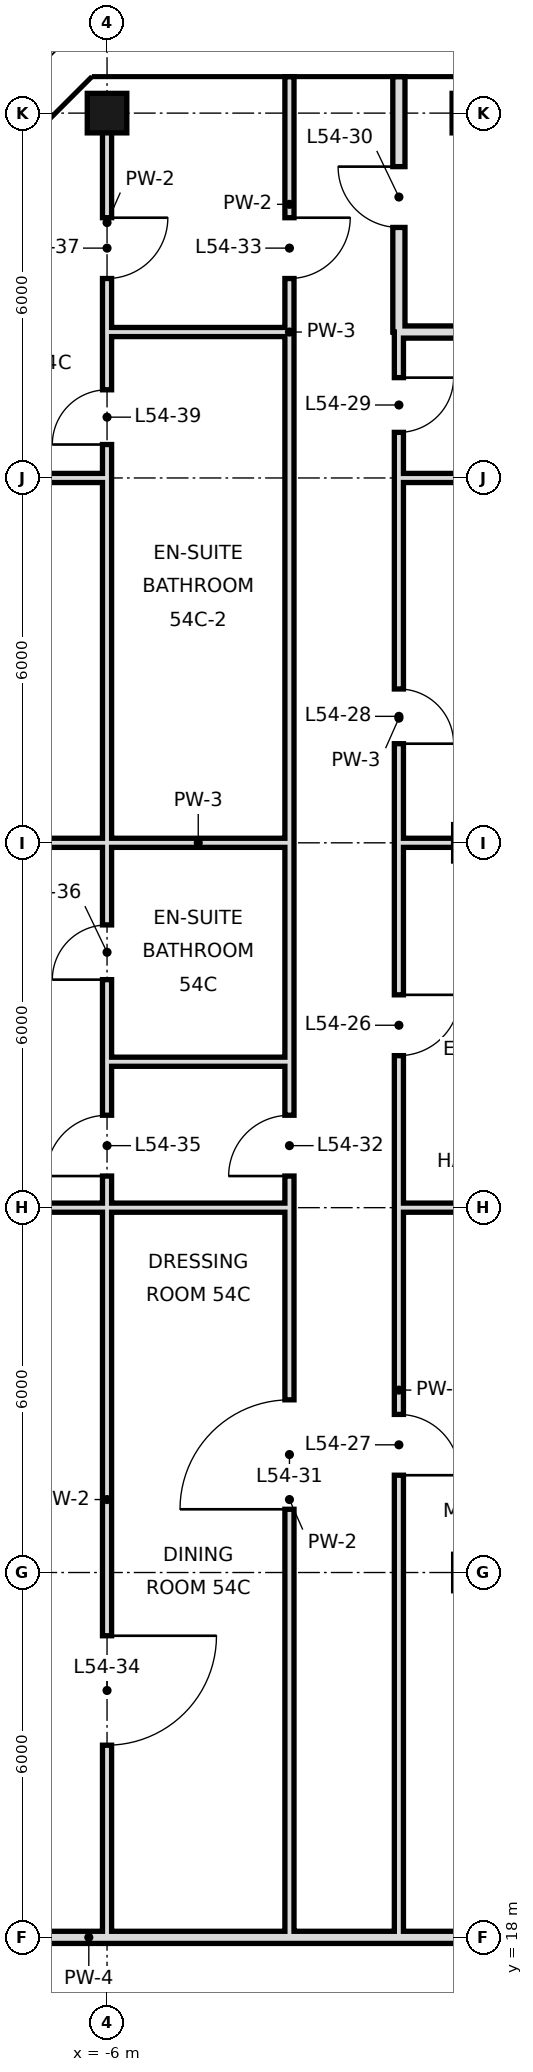
"""IFC4 building model, lengths in metres.
Left out: names, types, materials, properties, quantities, classifications, styles, units other than length and angle.
Written with IfcOpenShell. Run it as: python <this file> out.ifc"""

import sys

from ifc_helpers import new_model, si_unit, direction, frame, frame_2d, origin, origin_2d, place, context, subcontext, project, spatial, rectangle, hollow_rectangle, extrude, element, fill, save


model = new_model("IFC4")
c1 = context("Model", 3, precision=1e-05, world=origin(), true_north=direction((0.0, 1.0)))
c2 = subcontext(c1, "Body", "Model", "MODEL_VIEW")
j1 = project(units=[si_unit("LENGTHUNIT", "METRE"), si_unit("PLANEANGLEUNIT", "RADIAN")], contexts=[c1])
p1 = place(None, origin())
s1 = spatial("IfcSite", under=j1, at=p1, CompositionType="ELEMENT")
p2 = place(p1, origin())
s2 = spatial("IfcBuilding", under=s1, at=p2, CompositionType="ELEMENT")
p3 = place(p2, frame((0.0, 0.0, 229.8)))
s3 = spatial("IfcBuildingStorey", under=s2, at=p3, CompositionType="ELEMENT", Elevation=229.8)
for number, where, z_axis, x_axis in (
    (1, (-6.0, 48.0, 0.0), (0.0, 0.0, 1.0), (1.0, 0.0, 0.0)),
    (2, (0.0, 48.0, 0.0), (0.0, 0.0, 1.0), (1.0, 0.0, 0.0)),
):
    element("IfcColumn", number, at=place(p3, frame(where, z_axis=z_axis, x_axis=x_axis)), inside=s3, PredefinedType="COLUMN", context=c2, shape_type="SweptSolid", body=[
        extrude(hollow_rectangle(XDim=0.65, YDim=0.65, WallThickness=0.032, at=origin_2d()), origin(), (0.0, 0.0, 1.0), 4.4),
    ])
p4 = place(p3, frame((-1.2, 44.4, 0.0), z_axis=(0.0, 0.0, 1.0), x_axis=(0.0, 1.0, 0.0)))
e3 = element("IfcWall", 3, at=p4, inside=s3, PredefinedType="SOLIDWALL", context=c2, shape_type="SweptSolid", body=[
    extrude(rectangle(XDim=4.2, YDim=0.2, at=frame_2d((2.1, 0.0))), origin(), (0.0, 0.0, 1.0), 3.65),
])
p5 = place(p4, frame((1.72, 0.0, 0.0)))
e4 = element("IfcOpeningElement", 4, at=p5, cuts=e3, PredefinedType="OPENING", context=c2, shape_type="SweptSolid", body=[
    extrude(rectangle(XDim=1.0, YDim=2.4, at=frame_2d((0.5, 1.2))), frame((0.0, 0.11, 0.0), z_axis=(0.0, -1.0, 0.0), x_axis=(1.0, 0.0, 0.0)), (0.0, 0.0, 1.0), 0.22),
])
p6 = place(p3, frame((-1.2, 18.0, 0.0), z_axis=(0.0, 0.0, 1.0), x_axis=(0.0, 1.0, 0.0)))
e5 = element("IfcWall", 5, at=p6, inside=s3, PredefinedType="PARTITIONING", context=c2, shape_type="SweptSolid", body=[
    extrude(rectangle(XDim=18.0, YDim=0.15, at=frame_2d((9.0, 0.0))), origin(), (0.0, 0.0, 1.0), 4.1),
])
p7 = place(p6, frame((14.5, 0.0, 0.0)))
e6 = element("IfcOpeningElement", 6, at=p7, cuts=e5, PredefinedType="OPENING", context=c2, shape_type="SweptSolid", body=[
    extrude(rectangle(XDim=1.0, YDim=2.4, at=frame_2d((0.5, 1.2))), frame((0.0, 0.085, 0.0), z_axis=(0.0, -1.0, 0.0), x_axis=(1.0, 0.0, 0.0)), (0.0, 0.0, 1.0), 0.17),
])
p8 = place(p6, frame((7.6, 0.0, 0.0)))
e7 = element("IfcOpeningElement", 7, at=p8, cuts=e5, PredefinedType="OPENING", context=c2, shape_type="SweptSolid", body=[
    extrude(rectangle(XDim=1.0, YDim=2.4, at=frame_2d((0.5, 1.2))), frame((0.0, 0.085, 0.0), z_axis=(0.0, -1.0, 0.0), x_axis=(1.0, 0.0, 0.0)), (0.0, 0.0, 1.0), 0.17),
])
p9 = place(p3, frame((-1.2, 36.0, 0.0), z_axis=(0.0, 0.0, 1.0), x_axis=(0.0, 1.0, 0.0)))
e8 = element("IfcWall", 8, at=p9, inside=s3, PredefinedType="PARTITIONING", context=c2, shape_type="SweptSolid", body=[
    extrude(rectangle(XDim=8.4, YDim=0.15, at=frame_2d((4.2, 0.0))), origin(), (0.0, 0.0, 1.0), 4.1),
])
p10 = place(p9, frame((1.63, 0.0, 0.0)))
e9 = element("IfcOpeningElement", 9, at=p10, cuts=e8, PredefinedType="OPENING", context=c2, shape_type="SweptSolid", body=[
    extrude(rectangle(XDim=0.9, YDim=2.1, at=frame_2d((0.45, 1.05))), frame((0.0, 0.085, 0.0), z_axis=(0.0, -1.0, 0.0), x_axis=(1.0, 0.0, 0.0)), (0.0, 0.0, 1.0), 0.17),
])
p11 = place(p9, frame((6.75, 0.0, 0.0)))
e10 = element("IfcOpeningElement", 10, at=p11, cuts=e8, PredefinedType="OPENING", context=c2, shape_type="SweptSolid", body=[
    extrude(rectangle(XDim=0.9, YDim=2.4, at=frame_2d((0.45, 1.2))), frame((0.0, 0.085, 0.0), z_axis=(0.0, -1.0, 0.0), x_axis=(1.0, 0.0, 0.0)), (0.0, 0.0, 1.0), 0.17),
])
p12 = place(p3, frame((-3.0, 18.0, 0.0), z_axis=(0.0, 0.0, 1.0), x_axis=(0.0, 1.0, 0.0)))
e11 = element("IfcWall", 11, at=p12, inside=s3, PredefinedType="PARTITIONING", context=c2, shape_type="SweptSolid", body=[
    extrude(rectangle(XDim=14.4, YDim=0.15, at=frame_2d((7.2, 0.0))), origin(), (0.0, 0.0, 1.0), 4.1),
])
p13 = place(p12, frame((7.04, 0.0, 0.0)))
e12 = element("IfcOpeningElement", 12, at=p13, cuts=e11, PredefinedType="OPENING", context=c2, shape_type="SweptSolid", body=[
    extrude(rectangle(XDim=1.8, YDim=2.4, at=frame_2d((0.9, 1.2))), frame((0.0, 0.085, 0.0), z_axis=(0.0, -1.0, 0.0), x_axis=(1.0, 0.0, 0.0)), (0.0, 0.0, 1.0), 0.17),
])
p14 = place(p12, frame((12.52, 0.0, 0.0)))
e13 = element("IfcOpeningElement", 13, at=p14, cuts=e11, PredefinedType="OPENING", context=c2, shape_type="SweptSolid", body=[
    extrude(rectangle(XDim=1.0, YDim=2.4, at=frame_2d((0.5, 1.2))), frame((0.0, 0.085, 0.0), z_axis=(0.0, -1.0, 0.0), x_axis=(1.0, 0.0, 0.0)), (0.0, 0.0, 1.0), 0.17),
])
p15 = place(p3, frame((-3.0, 44.4, 0.0), z_axis=(0.0, 0.0, 1.0), x_axis=(0.0, 1.0, 0.0)))
e14 = element("IfcWall", 14, at=p15, inside=s3, PredefinedType="PARTITIONING", context=c2, shape_type="SweptSolid", body=[
    extrude(rectangle(XDim=4.2, YDim=0.15, at=frame_2d((2.1, 0.0))), origin(), (0.0, 0.0, 1.0), 4.1),
])
p16 = place(p15, frame((0.88, 0.0, 0.0)))
e15 = element("IfcOpeningElement", 15, at=p16, cuts=e14, PredefinedType="OPENING", context=c2, shape_type="SweptSolid", body=[
    extrude(rectangle(XDim=1.0, YDim=2.4, at=frame_2d((0.5, 1.2))), frame((0.0, 0.085, 0.0), z_axis=(0.0, -1.0, 0.0), x_axis=(1.0, 0.0, 0.0)), (0.0, 0.0, 1.0), 0.17),
])
p17 = place(p3, frame((-3.0, 32.4, 0.0), z_axis=(0.0, 0.0, 1.0), x_axis=(0.0, 1.0, 0.0)))
e16 = element("IfcWall", 16, at=p17, inside=s3, PredefinedType="PARTITIONING", context=c2, shape_type="SweptSolid", body=[
    extrude(rectangle(XDim=12.0, YDim=0.15, at=frame_2d((6.0, 0.0))), origin(), (0.0, 0.0, 1.0), 4.1),
])
p18 = place(p3, frame((-6.0, 18.0, 0.0), z_axis=(0.0, 0.0, 1.0), x_axis=(0.0, 1.0, 0.0)))
e17 = element("IfcWall", 17, at=p18, inside=s3, PredefinedType="PARTITIONING", context=c2, shape_type="SweptSolid", body=[
    extrude(rectangle(XDim=14.4, YDim=0.15, at=frame_2d((7.2, 0.0))), origin(), (0.0, 0.0, 1.0), 4.1),
])
p19 = place(p18, frame((3.16, 0.0, 0.0)))
e18 = element("IfcOpeningElement", 18, at=p19, cuts=e17, PredefinedType="OPENING", context=c2, shape_type="SweptSolid", body=[
    extrude(rectangle(XDim=1.8, YDim=2.4, at=frame_2d((0.9, 1.2))), frame((0.0, 0.085, 0.0), z_axis=(0.0, -1.0, 0.0), x_axis=(1.0, 0.0, 0.0)), (0.0, 0.0, 1.0), 0.17),
])
p20 = place(p18, frame((12.52, 0.0, 0.0)))
e19 = element("IfcOpeningElement", 19, at=p20, cuts=e17, PredefinedType="OPENING", context=c2, shape_type="SweptSolid", body=[
    extrude(rectangle(XDim=1.0, YDim=2.4, at=frame_2d((0.5, 1.2))), frame((0.0, 0.085, 0.0), z_axis=(0.0, -1.0, 0.0), x_axis=(1.0, 0.0, 0.0)), (0.0, 0.0, 1.0), 0.17),
])
p21 = place(p3, frame((-6.0, 44.4, 0.0), z_axis=(0.0, 0.0, 1.0), x_axis=(0.0, 1.0, 0.0)))
e20 = element("IfcWall", 20, at=p21, inside=s3, PredefinedType="PARTITIONING", context=c2, shape_type="SweptSolid", body=[
    extrude(rectangle(XDim=3.6, YDim=0.15, at=frame_2d((1.8, 0.0))), origin(), (0.0, 0.0, 1.0), 4.1),
])
p22 = place(p21, frame((0.88, 0.0, 0.0)))
e21 = element("IfcOpeningElement", 21, at=p22, cuts=e20, PredefinedType="OPENING", context=c2, shape_type="SweptSolid", body=[
    extrude(rectangle(XDim=1.0, YDim=2.4, at=frame_2d((0.5, 1.2))), frame((0.0, 0.085, 0.0), z_axis=(0.0, -1.0, 0.0), x_axis=(1.0, 0.0, 0.0)), (0.0, 0.0, 1.0), 0.17),
])
p23 = place(p3, frame((-6.0, 32.4, 0.0), z_axis=(0.0, 0.0, 1.0), x_axis=(0.0, 1.0, 0.0)))
e22 = element("IfcWall", 22, at=p23, inside=s3, PredefinedType="PARTITIONING", context=c2, shape_type="SweptSolid", body=[
    extrude(rectangle(XDim=12.0, YDim=0.15, at=frame_2d((6.0, 0.0))), origin(), (0.0, 0.0, 1.0), 4.1),
])
p24 = place(p23, frame((1.35, 0.0, 0.0)))
e23 = element("IfcOpeningElement", 23, at=p24, cuts=e22, PredefinedType="OPENING", context=c2, shape_type="SweptSolid", body=[
    extrude(rectangle(XDim=0.9, YDim=2.4, at=frame_2d((0.45, 1.2))), frame((0.0, 0.085, 0.0), z_axis=(0.0, -1.0, 0.0), x_axis=(1.0, 0.0, 0.0)), (0.0, 0.0, 1.0), 0.17),
])
p25 = place(p23, frame((10.15, 0.0, 0.0)))
e24 = element("IfcOpeningElement", 24, at=p25, cuts=e22, PredefinedType="OPENING", context=c2, shape_type="SweptSolid", body=[
    extrude(rectangle(XDim=0.9, YDim=2.4, at=frame_2d((0.45, 1.2))), frame((0.0, 0.085, 0.0), z_axis=(0.0, -1.0, 0.0), x_axis=(1.0, 0.0, 0.0)), (0.0, 0.0, 1.0), 0.17),
])
p26 = place(p3, frame((-12.6, 18.0, 0.0), z_axis=(0.0, 0.0, 1.0), x_axis=(1.0, 0.0, 0.0)))
e25 = element("IfcWall", 25, at=p26, inside=s3, PredefinedType="SOLIDWALL", context=c2, shape_type="SweptSolid", body=[
    extrude(rectangle(XDim=12.6, YDim=0.2, at=frame_2d((6.3, 0.0))), origin(), (0.0, 0.0, 1.0), 3.4),
])
p27 = place(p3, frame((-12.6, 30.0, 0.0), z_axis=(0.0, 0.0, 1.0), x_axis=(1.0, 0.0, 0.0)))
e26 = element("IfcWall", 26, at=p27, inside=s3, PredefinedType="PARTITIONING", context=c2, shape_type="SweptSolid", body=[
    extrude(rectangle(XDim=9.6, YDim=0.15, at=frame_2d((4.8, 0.0))), origin(), (0.0, 0.0, 1.0), 3.4),
])
p28 = place(p3, frame((-1.2, 30.0, 0.0), z_axis=(0.0, 0.0, 1.0), x_axis=(1.0, 0.0, 0.0)))
e27 = element("IfcWall", 27, at=p28, inside=s3, PredefinedType="PARTITIONING", context=c2, shape_type="SweptSolid", body=[
    extrude(rectangle(XDim=4.3, YDim=0.15, at=frame_2d((2.15, 0.0))), origin(), (0.0, 0.0, 1.0), 3.4),
])
p29 = place(p3, frame((-6.0, 32.4, 0.0), z_axis=(0.0, 0.0, 1.0), x_axis=(1.0, 0.0, 0.0)))
e28 = element("IfcWall", 28, at=p29, inside=s3, PredefinedType="PARTITIONING", context=c2, shape_type="SweptSolid", body=[
    extrude(rectangle(XDim=3.0, YDim=0.15, at=frame_2d((1.5, 0.0))), origin(), (0.0, 0.0, 1.0), 4.1),
])
p30 = place(p3, frame((-12.0, 36.0, 0.0), z_axis=(0.0, 0.0, 1.0), x_axis=(1.0, 0.0, 0.0)))
e29 = element("IfcWall", 29, at=p30, inside=s3, PredefinedType="PARTITIONING", context=c2, shape_type="SweptSolid", body=[
    extrude(rectangle(XDim=6.0, YDim=0.15, at=frame_2d((3.0, 0.0))), origin(), (0.0, 0.0, 1.0), 3.4),
])
p31 = place(p3, frame((-6.0, 36.0, 0.0), z_axis=(0.0, 0.0, 1.0), x_axis=(1.0, 0.0, 0.0)))
e30 = element("IfcWall", 30, at=p31, inside=s3, PredefinedType="PARTITIONING", context=c2, shape_type="SweptSolid", body=[
    extrude(rectangle(XDim=3.0, YDim=0.15, at=frame_2d((1.5, 0.0))), origin(), (0.0, 0.0, 1.0), 3.4),
])
p32 = place(p3, frame((-1.2, 36.0, 0.0), z_axis=(0.0, 0.0, 1.0), x_axis=(1.0, 0.0, 0.0)))
e31 = element("IfcWall", 31, at=p32, inside=s3, PredefinedType="PARTITIONING", context=c2, shape_type="SweptSolid", body=[
    extrude(rectangle(XDim=4.3, YDim=0.15, at=frame_2d((2.15, 0.0))), origin(), (0.0, 0.0, 1.0), 3.4),
])
p33 = place(p3, frame((-12.0, 42.0, 0.0), z_axis=(0.0, 0.0, 1.0), x_axis=(1.0, 0.0, 0.0)))
e32 = element("IfcWall", 32, at=p33, inside=s3, PredefinedType="PARTITIONING", context=c2, shape_type="SweptSolid", body=[
    extrude(rectangle(XDim=6.0, YDim=0.15, at=frame_2d((3.0, 0.0))), origin(), (0.0, 0.0, 1.0), 3.4),
])
p34 = place(p33, frame((1.6, 0.0, 0.0)))
e33 = element("IfcOpeningElement", 33, at=p34, cuts=e32, PredefinedType="OPENING", context=c2, shape_type="SweptSolid", body=[
    extrude(rectangle(XDim=1.0, YDim=2.4, at=frame_2d((0.5, 1.2))), frame((0.0, 0.085, 0.0), z_axis=(0.0, -1.0, 0.0), x_axis=(1.0, 0.0, 0.0)), (0.0, 0.0, 1.0), 0.17),
])
p35 = place(p3, frame((-1.2, 42.0, 0.0), z_axis=(0.0, 0.0, 1.0), x_axis=(1.0, 0.0, 0.0)))
e34 = element("IfcWall", 34, at=p35, inside=s3, PredefinedType="PARTITIONING", context=c2, shape_type="SweptSolid", body=[
    extrude(rectangle(XDim=4.3, YDim=0.15, at=frame_2d((2.15, 0.0))), origin(), (0.0, 0.0, 1.0), 3.4),
])
p36 = place(p3, frame((-1.2, 44.4, 0.0), z_axis=(0.0, 0.0, 1.0), x_axis=(1.0, 0.0, 0.0)))
e35 = element("IfcWall", 35, at=p36, inside=s3, PredefinedType="SOLIDWALL", context=c2, shape_type="SweptSolid", body=[
    extrude(rectangle(XDim=4.3, YDim=0.2, at=frame_2d((2.15, 0.0))), origin(), (0.0, 0.0, 1.0), 3.4),
])
p37 = place(p3, frame((-6.0, 44.4, 0.0), z_axis=(0.0, 0.0, 1.0), x_axis=(1.0, 0.0, 0.0)))
e36 = element("IfcWall", 36, at=p37, inside=s3, PredefinedType="PARTITIONING", context=c2, shape_type="SweptSolid", body=[
    extrude(rectangle(XDim=3.0, YDim=0.15, at=frame_2d((1.5, 0.0))), origin(), (0.0, 0.0, 1.0), 4.1),
])
p38 = place(p7, origin())
e37 = element("IfcDoor", 37, at=p38, inside=s3, OperationType="SINGLE_SWING_RIGHT", PredefinedType="DOOR", context=c2, shape_type="SweptSolid", body=[
    extrude(rectangle(XDim=1.0, YDim=2.4, at=frame_2d((0.5, 1.2))), frame((0.0, 0.025, 0.0), z_axis=(0.0, -1.0, 0.0), x_axis=(1.0, 0.0, 0.0)), (0.0, 0.0, 1.0), 0.05),
])
fill(e6, e37)
p39 = place(p8, frame((1.0, 0.0, 0.0), z_axis=(0.0, 0.0, 1.0), x_axis=(-1.0, 0.0, 0.0)))
e38 = element("IfcDoor", 38, at=p39, inside=s3, OperationType="SINGLE_SWING_RIGHT", PredefinedType="DOOR", context=c2, shape_type="SweptSolid", body=[
    extrude(rectangle(XDim=1.0, YDim=2.4, at=frame_2d((0.5, 1.2))), frame((0.0, 0.025, 0.0), z_axis=(0.0, -1.0, 0.0), x_axis=(1.0, 0.0, 0.0)), (0.0, 0.0, 1.0), 0.05),
])
fill(e7, e38)
p40 = place(p10, frame((0.9, 0.0, 0.0), z_axis=(0.0, 0.0, 1.0), x_axis=(-1.0, 0.0, 0.0)))
e39 = element("IfcDoor", 39, at=p40, inside=s3, OperationType="SINGLE_SWING_RIGHT", PredefinedType="DOOR", context=c2, shape_type="SweptSolid", body=[
    extrude(rectangle(XDim=0.9, YDim=2.1, at=frame_2d((0.45, 1.05))), frame((0.0, 0.025, 0.0), z_axis=(0.0, -1.0, 0.0), x_axis=(1.0, 0.0, 0.0)), (0.0, 0.0, 1.0), 0.05),
])
fill(e9, e39)
p41 = place(p11, origin())
e40 = element("IfcDoor", 40, at=p41, inside=s3, OperationType="SINGLE_SWING_RIGHT", PredefinedType="DOOR", context=c2, shape_type="SweptSolid", body=[
    extrude(rectangle(XDim=0.9, YDim=2.4, at=frame_2d((0.45, 1.2))), frame((0.0, 0.025, 0.0), z_axis=(0.0, -1.0, 0.0), x_axis=(1.0, 0.0, 0.0)), (0.0, 0.0, 1.0), 0.05),
])
fill(e10, e40)
p42 = place(p5, frame((1.0, 0.0, 0.0), z_axis=(0.0, 0.0, 1.0), x_axis=(-1.0, 0.0, 0.0)))
e41 = element("IfcDoor", 41, at=p42, inside=s3, OperationType="SINGLE_SWING_LEFT", PredefinedType="DOOR", context=c2, shape_type="SweptSolid", body=[
    extrude(rectangle(XDim=1.0, YDim=2.4, at=frame_2d((0.5, 1.2))), frame((0.0, 0.025, 0.0), z_axis=(0.0, -1.0, 0.0), x_axis=(1.0, 0.0, 0.0)), (0.0, 0.0, 1.0), 0.05),
])
fill(e4, e41)
p43 = place(p13, origin())
e42 = element("IfcDoor", 42, at=p43, inside=s3, OperationType="SINGLE_SWING_LEFT", PredefinedType="DOOR", context=c2, shape_type="SweptSolid", body=[
    extrude(rectangle(XDim=1.8, YDim=2.4, at=frame_2d((0.9, 1.2))), frame((0.0, 0.025, 0.0), z_axis=(0.0, -1.0, 0.0), x_axis=(1.0, 0.0, 0.0)), (0.0, 0.0, 1.0), 0.05),
])
fill(e12, e42)
p44 = place(p14, origin())
e43 = element("IfcDoor", 43, at=p44, inside=s3, OperationType="SINGLE_SWING_LEFT", PredefinedType="DOOR", context=c2, shape_type="SweptSolid", body=[
    extrude(rectangle(XDim=1.0, YDim=2.4, at=frame_2d((0.5, 1.2))), frame((0.0, 0.025, 0.0), z_axis=(0.0, -1.0, 0.0), x_axis=(1.0, 0.0, 0.0)), (0.0, 0.0, 1.0), 0.05),
])
fill(e13, e43)
p45 = place(p16, origin())
e44 = element("IfcDoor", 44, at=p45, inside=s3, OperationType="SINGLE_SWING_RIGHT", PredefinedType="DOOR", context=c2, shape_type="SweptSolid", body=[
    extrude(rectangle(XDim=1.0, YDim=2.4, at=frame_2d((0.5, 1.2))), frame((0.0, 0.025, 0.0), z_axis=(0.0, -1.0, 0.0), x_axis=(1.0, 0.0, 0.0)), (0.0, 0.0, 1.0), 0.05),
])
fill(e15, e44)
p46 = place(p19, origin())
e45 = element("IfcDoor", 45, at=p46, inside=s3, OperationType="SINGLE_SWING_RIGHT", PredefinedType="DOOR", context=c2, shape_type="SweptSolid", body=[
    extrude(rectangle(XDim=1.8, YDim=2.4, at=frame_2d((0.9, 1.2))), frame((0.0, 0.025, 0.0), z_axis=(0.0, -1.0, 0.0), x_axis=(1.0, 0.0, 0.0)), (0.0, 0.0, 1.0), 0.05),
])
fill(e18, e45)
p47 = place(p20, origin())
e46 = element("IfcDoor", 46, at=p47, inside=s3, OperationType="SINGLE_SWING_LEFT", PredefinedType="DOOR", context=c2, shape_type="SweptSolid", body=[
    extrude(rectangle(XDim=1.0, YDim=2.4, at=frame_2d((0.5, 1.2))), frame((0.0, 0.025, 0.0), z_axis=(0.0, -1.0, 0.0), x_axis=(1.0, 0.0, 0.0)), (0.0, 0.0, 1.0), 0.05),
])
fill(e19, e46)
p48 = place(p24, origin())
e47 = element("IfcDoor", 47, at=p48, inside=s3, OperationType="SINGLE_SWING_LEFT", PredefinedType="DOOR", context=c2, shape_type="SweptSolid", body=[
    extrude(rectangle(XDim=0.9, YDim=2.4, at=frame_2d((0.45, 1.2))), frame((0.0, 0.025, 0.0), z_axis=(0.0, -1.0, 0.0), x_axis=(1.0, 0.0, 0.0)), (0.0, 0.0, 1.0), 0.05),
])
fill(e23, e47)
p49 = place(p22, origin())
e48 = element("IfcDoor", 48, at=p49, inside=s3, OperationType="SINGLE_SWING_RIGHT", PredefinedType="DOOR", context=c2, shape_type="SweptSolid", body=[
    extrude(rectangle(XDim=1.0, YDim=2.4, at=frame_2d((0.5, 1.2))), frame((0.0, 0.025, 0.0), z_axis=(0.0, -1.0, 0.0), x_axis=(1.0, 0.0, 0.0)), (0.0, 0.0, 1.0), 0.05),
])
fill(e21, e48)
p50 = place(p25, origin())
e49 = element("IfcDoor", 49, at=p50, inside=s3, OperationType="SINGLE_SWING_LEFT", PredefinedType="DOOR", context=c2, shape_type="SweptSolid", body=[
    extrude(rectangle(XDim=0.9, YDim=2.4, at=frame_2d((0.45, 1.2))), frame((0.0, 0.025, 0.0), z_axis=(0.0, -1.0, 0.0), x_axis=(1.0, 0.0, 0.0)), (0.0, 0.0, 1.0), 0.05),
])
fill(e24, e49)
save(model, sys.argv[1])
